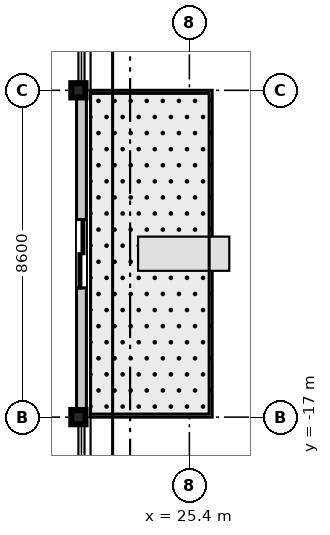
"""IFC4 building model, lengths in metres.
Left out: names, types, materials, properties, quantities, classifications, styles, units other than length and angle.
Written with IfcOpenShell. Run it as: python <this file> out.ifc"""

import sys

from ifc_helpers import new_model, si_unit, direction, frame, frame_2d, origin, origin_2d, place, context, subcontext, project, spatial, rectangle, i_section, extrude, source, transform, mapped, element, fill, save


model = new_model("IFC4")
c1 = context("Model", 3, precision=1e-05, world=origin(), true_north=direction((0.0, 1.0)))
c2 = subcontext(c1, "Body", "Model", "MODEL_VIEW")
j1 = project(units=[si_unit("LENGTHUNIT", "METRE"), si_unit("PLANEANGLEUNIT", "RADIAN")], contexts=[c1])
p1 = place(None, origin())
s1 = spatial("IfcSite", under=j1, at=p1, CompositionType="ELEMENT")
p2 = place(p1, origin())
s2 = spatial("IfcBuilding", under=s1, at=p2, CompositionType="ELEMENT")
p3 = place(p2, frame((0.0, 0.0, 266.3)))
s3 = spatial("IfcBuildingStorey", under=s2, at=p3, CompositionType="ELEMENT", Elevation=266.3)
m1 = source(origin(), c2, "Body", "SweptSolid", [
    extrude(i_section(OverallWidth=0.374, OverallDepth=0.374, WebThickness=0.014, FlangeThickness=0.023, at=origin_2d()), origin(), (0.0, 0.0, 1.0), 3.705),
])
for number, where, z_axis, x_axis in (
    (1, (22.48, -17.0, 0.0), (0.0, 0.0, 1.0), (1.0, 0.0, 0.0)),
    (2, (22.48, -8.4, 0.0), (0.0, 0.0, 1.0), (1.0, 0.0, 0.0)),
):
    element("IfcColumn", number, at=place(p3, frame(where, z_axis=z_axis, x_axis=x_axis)), inside=s3, PredefinedType="COLUMN", context=c2, shape_type="MappedRepresentation", body=[
        mapped(m1, transform((0.0, 0.0, 0.0), scale=1.0)),
    ])
m2 = source(origin(), c2, "Body", "SweptSolid", [
    extrude(rectangle(XDim=8.6, YDim=0.26, at=frame_2d((4.3, 0.0))), origin(), (0.0, 0.0, 1.0), 2.93),
])
p4 = place(p3, frame((22.56, -17.0, 0.0), z_axis=(0.0, 0.0, 1.0), x_axis=(0.0, 1.0, 0.0)))
e3 = element("IfcWall", 3, at=p4, inside=s3, PredefinedType="STANDARD", context=c2, shape_type="MappedRepresentation", body=[
    mapped(m2, transform((0.0, 0.0, 0.0), scale=1.0)),
])
p5 = place(p4, frame((3.4, 0.0, 0.0)))
e4 = element("IfcOpeningElement", 4, at=p5, cuts=e3, PredefinedType="OPENING", context=c2, shape_type="SweptSolid", body=[
    extrude(rectangle(XDim=1.8, YDim=2.25, at=frame_2d((0.9, 1.125))), frame((0.0, 0.14, 0.0), z_axis=(0.0, -1.0, 0.0), x_axis=(1.0, 0.0, 0.0)), (0.0, 0.0, 1.0), 0.28),
])
m3 = source(origin(), c2, "Body", "SweptSolid", [
    extrude(rectangle(XDim=1.8, YDim=2.25, at=frame_2d((0.9, 1.125))), frame((0.0, 0.025, 0.0), z_axis=(0.0, -1.0, 0.0), x_axis=(1.0, 0.0, 0.0)), (0.0, 0.0, 1.0), 0.05),
])
p6 = place(p5, frame((1.8, 0.0, 0.0), z_axis=(0.0, 0.0, 1.0), x_axis=(-1.0, 0.0, 0.0)))
e5 = element("IfcDoor", 5, at=p6, inside=s3, OperationType="DOUBLE_DOOR_SLIDING", PredefinedType="DOOR", context=c2, shape_type="MappedRepresentation", body=[
    mapped(m3, transform((0.0, 0.0, 0.0), scale=1.0)),
])
fill(e4, e5)
save(model, sys.argv[1])
